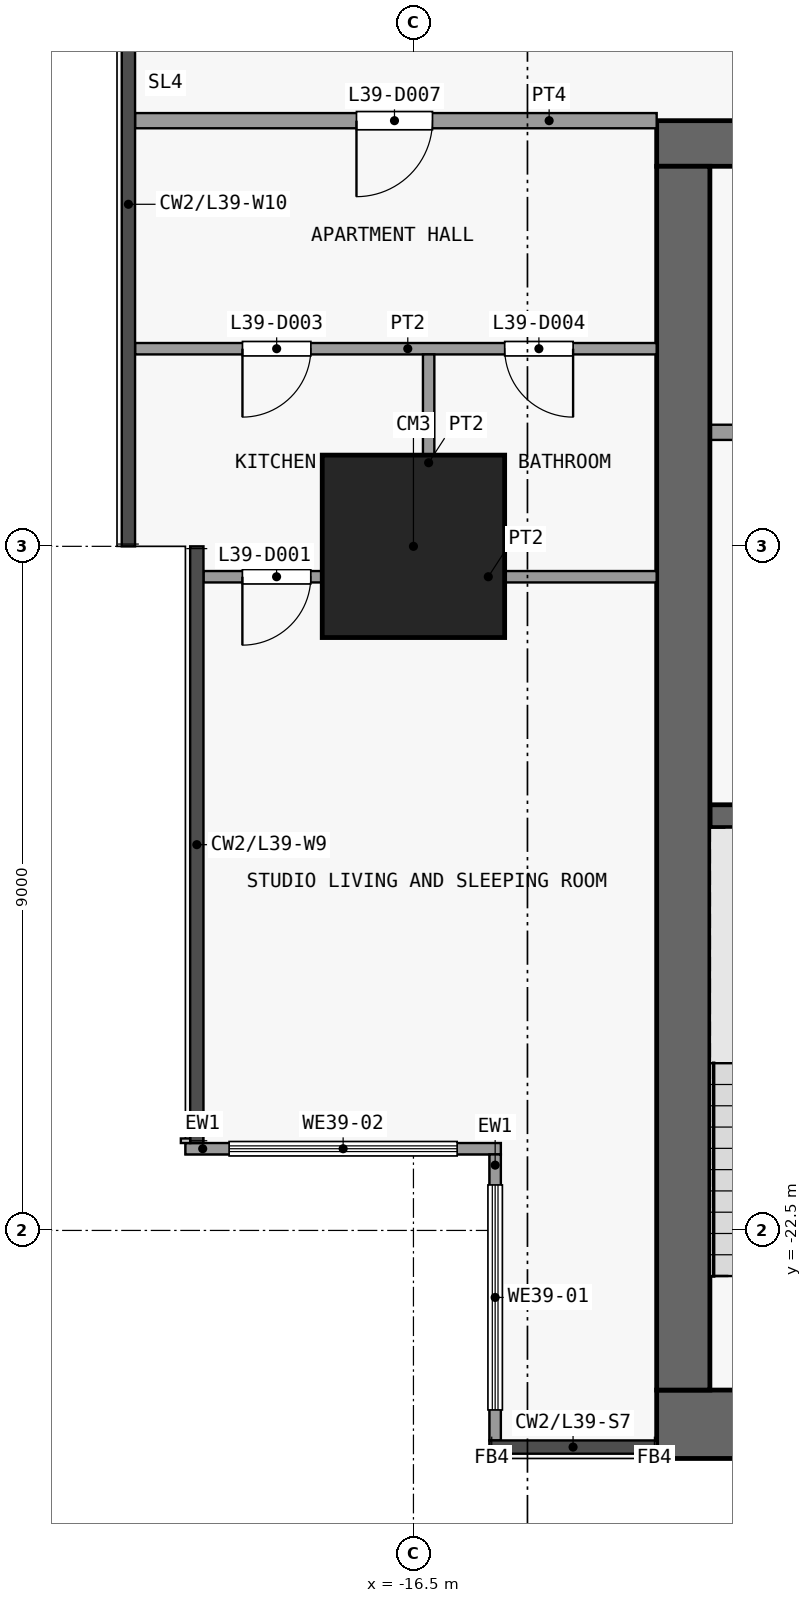
"""IFC4 building model, lengths in metres.
Left out: names, types, materials, properties, quantities, classifications, styles, units other than length and angle.
Written with IfcOpenShell. Run it as: python <this file> out.ifc"""

import sys

from ifc_helpers import new_model, si_unit, direction, frame, frame_2d, origin, origin_2d, place, context, subcontext, project, spatial, rectangle, extrude, element, fill, save


model = new_model("IFC4")
c1 = context("Model", 3, precision=1e-05, world=origin(), true_north=direction((0.0, 1.0)))
c2 = subcontext(c1, "Body", "Model", "MODEL_VIEW")
j1 = project(units=[si_unit("LENGTHUNIT", "METRE"), si_unit("PLANEANGLEUNIT", "RADIAN")], contexts=[c1])
p1 = place(None, origin())
s1 = spatial("IfcSite", under=j1, at=p1, CompositionType="ELEMENT")
p2 = place(p1, origin())
s2 = spatial("IfcBuilding", under=s1, at=p2, CompositionType="ELEMENT")
p3 = place(p2, frame((0.0, 0.0, 160.1)))
s3 = spatial("IfcBuildingStorey", under=s2, at=p3, CompositionType="ELEMENT", Elevation=160.1)
p4 = place(p3, frame((-16.5, -13.5, 0.0), z_axis=(0.0, 0.0, 1.0), x_axis=(1.0, 0.0, 0.0)))
e1 = element("IfcColumn", 1, at=p4, inside=s3, PredefinedType="COLUMN", context=c2, shape_type="SweptSolid", body=[
    extrude(rectangle(XDim=2.4, YDim=2.4, at=origin_2d()), origin(), (0.0, 0.0, 1.0), 3.6),
])
p5 = place(p3, frame((-13.3, -25.05, 0.0), z_axis=(0.0, 0.0, 1.0), x_axis=(1.0, 0.0, 0.0)))
e2 = element("IfcWall", 2, at=p5, inside=s3, PredefinedType="SHEAR", context=c2, shape_type="SweptSolid", body=[
    extrude(rectangle(XDim=26.6, YDim=0.9, at=frame_2d((13.3, 0.0))), origin(), (0.0, 0.0, 1.0), 3.3),
])
p6 = place(p3, frame((-13.3, -8.2, 0.0), z_axis=(0.0, 0.0, 1.0), x_axis=(1.0, 0.0, 0.0)))
e3 = element("IfcWall", 3, at=p6, inside=s3, PredefinedType="SHEAR", context=c2, shape_type="SweptSolid", body=[
    extrude(rectangle(XDim=26.6, YDim=0.6, at=frame_2d((13.3, 0.0))), origin(), (0.0, 0.0, 1.0), 3.3),
])
p7 = place(p6, frame((7.6, 0.0, 0.0)))
e4 = element("IfcOpeningElement", 4, at=p7, cuts=e3, PredefinedType="OPENING", context=c2, shape_type="SweptSolid", body=[
    extrude(rectangle(XDim=1.8, YDim=2.1, at=frame_2d((0.9, 1.05))), frame((0.0, 0.31, 0.0), z_axis=(0.0, -1.0, 0.0), x_axis=(1.0, 0.0, 0.0)), (0.0, 0.0, 1.0), 0.62),
])
p8 = place(p6, frame((17.2, 0.0, 0.0)))
e5 = element("IfcOpeningElement", 5, at=p8, cuts=e3, PredefinedType="OPENING", context=c2, shape_type="SweptSolid", body=[
    extrude(rectangle(XDim=1.8, YDim=2.1, at=frame_2d((0.9, 1.05))), frame((0.0, 0.31, 0.0), z_axis=(0.0, -1.0, 0.0), x_axis=(1.0, 0.0, 0.0)), (0.0, 0.0, 1.0), 0.62),
])
p9 = place(p6, frame((2.525, 0.0, 0.0)))
e6 = element("IfcOpeningElement", 6, at=p9, cuts=e3, PredefinedType="OPENING", context=c2, shape_type="SweptSolid", body=[
    extrude(rectangle(XDim=0.9, YDim=2.1, at=frame_2d((0.45, 1.05))), frame((0.0, 0.31, 0.0), z_axis=(0.0, -1.0, 0.0), x_axis=(1.0, 0.0, 0.0)), (0.0, 0.0, 1.0), 0.62),
])
p10 = place(p6, frame((23.875, 0.0, 0.0)))
e7 = element("IfcOpeningElement", 7, at=p10, cuts=e3, PredefinedType="OPENING", context=c2, shape_type="SweptSolid", body=[
    extrude(rectangle(XDim=1.2, YDim=2.1, at=frame_2d((0.6, 1.05))), frame((0.0, 0.31, 0.0), z_axis=(0.0, -1.0, 0.0), x_axis=(1.0, 0.0, 0.0)), (0.0, 0.0, 1.0), 0.62),
])
p11 = place(p3, frame((-12.95, -24.6, 0.0), z_axis=(0.0, 0.0, 1.0), x_axis=(0.0, 1.0, 0.0)))
e8 = element("IfcWall", 8, at=p11, inside=s3, PredefinedType="SHEAR", context=c2, shape_type="SweptSolid", body=[
    extrude(rectangle(XDim=16.1, YDim=0.7, at=frame_2d((8.05, 0.0))), origin(), (0.0, 0.0, 1.0), 3.3),
])
p12 = place(p3, frame((-12.6, -17.05, 0.0), z_axis=(0.0, 0.0, 1.0), x_axis=(1.0, 0.0, 0.0)))
e9 = element("IfcWall", 9, at=p12, inside=s3, PredefinedType="SHEAR", context=c2, shape_type="SweptSolid", body=[
    extrude(rectangle(XDim=3.1, YDim=0.3, at=frame_2d((1.55, 0.0))), origin(), (0.0, 0.0, 1.0), 3.3),
])
p13 = place(p3, frame((-12.6, -12.0, 0.0), z_axis=(0.0, 0.0, 1.0), x_axis=(1.0, 0.0, 0.0)))
e10 = element("IfcWall", 10, at=p13, inside=s3, PredefinedType="PARTITIONING", context=c2, shape_type="SweptSolid", body=[
    extrude(rectangle(XDim=1.45, YDim=0.2, at=frame_2d((0.725, 0.0))), origin(), (0.0, 0.0, 1.0), 3.3),
])
p14 = place(p3, frame((-15.425, -25.262, 0.0), z_axis=(0.0, 0.0, 1.0), x_axis=(0.0, 1.0, 0.0)))
e11 = element("IfcWall", 11, at=p14, inside=s3, PredefinedType="SOLIDWALL", context=c2, shape_type="SweptSolid", body=[
    extrude(rectangle(XDim=3.762, YDim=0.15, at=frame_2d((1.881, 0.0))), origin(), (0.0, 0.0, 1.0), 3.3),
])
p15 = place(p14, frame((0.401, 0.0, 0.9)))
e12 = element("IfcOpeningElement", 12, at=p15, cuts=e11, PredefinedType="OPENING", context=c2, shape_type="SweptSolid", body=[
    extrude(rectangle(XDim=2.96, YDim=2.4, at=frame_2d((1.48, 1.2))), frame((0.0, 0.085, 0.0), z_axis=(0.0, -1.0, 0.0), x_axis=(1.0, 0.0, 0.0)), (0.0, 0.0, 1.0), 0.17),
])
p16 = place(p3, frame((-15.35, -21.425, 0.0), z_axis=(0.0, 0.0, 1.0), x_axis=(-1.0, 0.0, 0.0)))
e13 = element("IfcWall", 13, at=p16, inside=s3, PredefinedType="SOLIDWALL", context=c2, shape_type="SweptSolid", body=[
    extrude(rectangle(XDim=4.15, YDim=0.15, at=frame_2d((2.075, 0.0))), origin(), (0.0, 0.0, 1.0), 3.3),
])
p17 = place(p16, frame((0.575, 0.0, 0.9)))
e14 = element("IfcOpeningElement", 14, at=p17, cuts=e13, PredefinedType="OPENING", context=c2, shape_type="SweptSolid", body=[
    extrude(rectangle(XDim=3.0, YDim=2.4, at=frame_2d((1.5, 1.2))), frame((0.0, 0.085, 0.0), z_axis=(0.0, -1.0, 0.0), x_axis=(1.0, 0.0, 0.0)), (0.0, 0.0, 1.0), 0.17),
])
p18 = place(p3, frame((-19.262, -13.9, 0.0), z_axis=(0.0, 0.0, 1.0), x_axis=(1.0, 0.0, 0.0)))
e15 = element("IfcWall", 15, at=p18, inside=s3, PredefinedType="PARTITIONING", context=c2, shape_type="SweptSolid", body=[
    extrude(rectangle(XDim=5.962, YDim=0.15, at=frame_2d((2.981, 0.0))), origin(), (0.0, 0.0, 1.0), 3.3),
])
p19 = place(p18, frame((0.512, 0.0, 0.0)))
e16 = element("IfcOpeningElement", 16, at=p19, cuts=e15, PredefinedType="OPENING", context=c2, shape_type="SweptSolid", body=[
    extrude(rectangle(XDim=0.9, YDim=2.1, at=frame_2d((0.45, 1.05))), frame((0.0, 0.085, 0.0), z_axis=(0.0, -1.0, 0.0), x_axis=(1.0, 0.0, 0.0)), (0.0, 0.0, 1.0), 0.17),
])
p20 = place(p3, frame((-20.163, -10.9, 0.0), z_axis=(0.0, 0.0, 1.0), x_axis=(1.0, 0.0, 0.0)))
e17 = element("IfcWall", 17, at=p20, inside=s3, PredefinedType="PARTITIONING", context=c2, shape_type="SweptSolid", body=[
    extrude(rectangle(XDim=6.863, YDim=0.15, at=frame_2d((3.431, 0.0))), origin(), (0.0, 0.0, 1.0), 3.3),
])
p21 = place(p20, frame((1.413, 0.0, 0.0)))
e18 = element("IfcOpeningElement", 18, at=p21, cuts=e17, PredefinedType="OPENING", context=c2, shape_type="SweptSolid", body=[
    extrude(rectangle(XDim=0.9, YDim=2.1, at=frame_2d((0.45, 1.05))), frame((0.0, 0.085, 0.0), z_axis=(0.0, -1.0, 0.0), x_axis=(1.0, 0.0, 0.0)), (0.0, 0.0, 1.0), 0.17),
])
p22 = place(p20, frame((4.863, 0.0, 0.0)))
e19 = element("IfcOpeningElement", 19, at=p22, cuts=e17, PredefinedType="OPENING", context=c2, shape_type="SweptSolid", body=[
    extrude(rectangle(XDim=0.9, YDim=2.1, at=frame_2d((0.45, 1.05))), frame((0.0, 0.085, 0.0), z_axis=(0.0, -1.0, 0.0), x_axis=(1.0, 0.0, 0.0)), (0.0, 0.0, 1.0), 0.17),
])
p23 = place(p3, frame((-20.163, -7.9, 0.0), z_axis=(0.0, 0.0, 1.0), x_axis=(1.0, 0.0, 0.0)))
e20 = element("IfcWall", 20, at=p23, inside=s3, PredefinedType="PARTITIONING", context=c2, shape_type="SweptSolid", body=[
    extrude(rectangle(XDim=6.863, YDim=0.2, at=frame_2d((3.431, 0.0))), origin(), (0.0, 0.0, 1.0), 3.3),
])
p24 = place(p23, frame((2.913, 0.0, 0.0)))
e21 = element("IfcOpeningElement", 21, at=p24, cuts=e20, PredefinedType="OPENING", context=c2, shape_type="SweptSolid", body=[
    extrude(rectangle(XDim=1.0, YDim=2.1, at=frame_2d((0.5, 1.05))), frame((0.0, 0.11, 0.0), z_axis=(0.0, -1.0, 0.0), x_axis=(1.0, 0.0, 0.0)), (0.0, 0.0, 1.0), 0.22),
])
p25 = place(p3, frame((-16.3, -13.825, 0.0), z_axis=(0.0, 0.0, 1.0), x_axis=(0.0, 1.0, 0.0)))
e22 = element("IfcWall", 22, at=p25, inside=s3, PredefinedType="PARTITIONING", context=c2, shape_type="SweptSolid", body=[
    extrude(rectangle(XDim=2.85, YDim=0.15, at=frame_2d((1.425, 0.0))), origin(), (0.0, 0.0, 1.0), 3.3),
])
p26 = place(p15, origin())
e23 = element("IfcWindow", 23, at=p26, inside=s3, PartitioningType="SINGLE_PANEL", PredefinedType="WINDOW", context=c2, shape_type="SweptSolid", body=[
    extrude(rectangle(XDim=2.96, YDim=2.4, at=frame_2d((1.48, 1.2))), frame((0.0, 0.03, 0.0), z_axis=(0.0, -1.0, 0.0), x_axis=(1.0, 0.0, 0.0)), (0.0, 0.0, 1.0), 0.06),
])
fill(e12, e23)
p27 = place(p17, origin())
e24 = element("IfcWindow", 24, at=p27, inside=s3, PartitioningType="SINGLE_PANEL", PredefinedType="WINDOW", context=c2, shape_type="SweptSolid", body=[
    extrude(rectangle(XDim=3.0, YDim=2.4, at=frame_2d((1.5, 1.2))), frame((0.0, 0.03, 0.0), z_axis=(0.0, -1.0, 0.0), x_axis=(1.0, 0.0, 0.0)), (0.0, 0.0, 1.0), 0.06),
])
fill(e14, e24)
p28 = place(p19, origin())
e25 = element("IfcDoor", 25, at=p28, inside=s3, OperationType="SINGLE_SWING_LEFT", PredefinedType="DOOR", context=c2, shape_type="SweptSolid", body=[
    extrude(rectangle(XDim=0.9, YDim=2.1, at=frame_2d((0.45, 1.05))), frame((0.0, 0.025, 0.0), z_axis=(0.0, -1.0, 0.0), x_axis=(1.0, 0.0, 0.0)), (0.0, 0.0, 1.0), 0.05),
])
fill(e16, e25)
p29 = place(p21, origin())
e26 = element("IfcDoor", 26, at=p29, inside=s3, OperationType="SINGLE_SWING_LEFT", PredefinedType="DOOR", context=c2, shape_type="SweptSolid", body=[
    extrude(rectangle(XDim=0.9, YDim=2.1, at=frame_2d((0.45, 1.05))), frame((0.0, 0.025, 0.0), z_axis=(0.0, -1.0, 0.0), x_axis=(1.0, 0.0, 0.0)), (0.0, 0.0, 1.0), 0.05),
])
fill(e18, e26)
p30 = place(p22, origin())
e27 = element("IfcDoor", 27, at=p30, inside=s3, OperationType="SINGLE_SWING_RIGHT", PredefinedType="DOOR", context=c2, shape_type="SweptSolid", body=[
    extrude(rectangle(XDim=0.9, YDim=2.1, at=frame_2d((0.45, 1.05))), frame((0.0, 0.025, 0.0), z_axis=(0.0, -1.0, 0.0), x_axis=(1.0, 0.0, 0.0)), (0.0, 0.0, 1.0), 0.05),
])
fill(e19, e27)
p31 = place(p24, origin())
e28 = element("IfcDoor", 28, at=p31, inside=s3, OperationType="SINGLE_SWING_LEFT", PredefinedType="DOOR", context=c2, shape_type="SweptSolid", body=[
    extrude(rectangle(XDim=1.0, YDim=2.1, at=frame_2d((0.5, 1.05))), frame((0.0, 0.025, 0.0), z_axis=(0.0, -1.0, 0.0), x_axis=(1.0, 0.0, 0.0)), (0.0, 0.0, 1.0), 0.05),
])
fill(e21, e28)
save(model, sys.argv[1])
